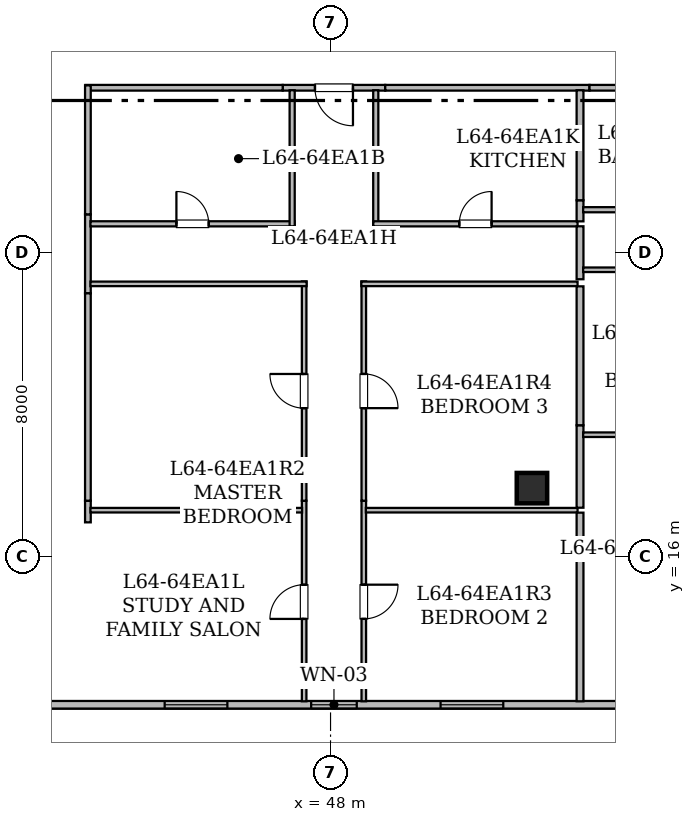
"""IFC4 building model, lengths in metres.
Left out: names, types, materials, properties, quantities, classifications, styles, units other than length and angle.
Written with IfcOpenShell. Run it as: python <this file> out.ifc"""

import sys

from ifc_helpers import new_model, si_unit, direction, frame, frame_2d, origin, origin_2d, place, context, subcontext, project, spatial, rectangle, hollow_rectangle, extrude, element, fill, save


model = new_model("IFC4")
c1 = context("Model", 3, precision=1e-05, world=origin(), true_north=direction((0.0, 1.0)))
c2 = subcontext(c1, "Body", "Model", "MODEL_VIEW")
j1 = project(units=[si_unit("LENGTHUNIT", "METRE"), si_unit("PLANEANGLEUNIT", "RADIAN")], contexts=[c1])
p1 = place(None, origin())
s1 = spatial("IfcSite", under=j1, at=p1, CompositionType="ELEMENT")
p2 = place(p1, origin())
s2 = spatial("IfcBuilding", under=s1, at=p2, CompositionType="ELEMENT")
p3 = place(p2, frame((0.0, 0.0, 250.05)))
s3 = spatial("IfcBuildingStorey", under=s2, at=p3, CompositionType="ELEMENT", Elevation=250.05)
for number, where, z_axis, x_axis in (
    (1, (51.083, 14.5, 0.0), (0.0, 0.0, 1.0), (1.0, 0.0, 0.0)),
    (2, (53.3, 17.8, 0.0), (0.0, 0.0, 1.0), (1.0, 0.0, 0.0)),
):
    element("IfcColumn", number, at=place(p3, frame(where, z_axis=z_axis, x_axis=x_axis)), inside=s3, PredefinedType="COLUMN", context=c2, shape_type="SweptSolid", body=[
        extrude(hollow_rectangle(XDim=0.8, YDim=0.8, WallThickness=0.04, at=origin_2d()), origin(), (0.0, 0.0, 1.0), 3.65),
    ])
p4 = place(p3, frame((65.696, 12.1, 0.0), z_axis=(0.0, 0.0, 1.0), x_axis=(-1.0, 0.0, 0.0)))
e3 = element("IfcWall", 3, at=p4, inside=s3, PredefinedType="STANDARD", context=c2, shape_type="SweptSolid", body=[
    extrude(rectangle(XDim=41.393, YDim=0.2, at=frame_2d((20.697, 0.0))), origin(), (0.0, 0.0, 1.0), 3.43),
])
p5 = place(p4, frame((33.821, 0.0, 0.85)))
e4 = element("IfcOpeningElement", 4, at=p5, cuts=e3, PredefinedType="OPENING", context=c2, shape_type="SweptSolid", body=[
    extrude(rectangle(XDim=1.65, YDim=1.55, at=frame_2d((0.825, 0.775))), frame((0.0, 0.11, 0.0), z_axis=(0.0, -1.0, 0.0), x_axis=(1.0, 0.0, 0.0)), (0.0, 0.0, 1.0), 0.22),
])
p6 = place(p4, frame((39.16, 0.0, 0.85)))
e5 = element("IfcOpeningElement", 5, at=p6, cuts=e3, PredefinedType="OPENING", context=c2, shape_type="SweptSolid", body=[
    extrude(rectangle(XDim=1.65, YDim=1.55, at=frame_2d((0.825, 0.775))), frame((0.0, 0.11, 0.0), z_axis=(0.0, -1.0, 0.0), x_axis=(1.0, 0.0, 0.0)), (0.0, 0.0, 1.0), 0.22),
])
p7 = place(p4, frame((17.006, 0.0, 0.8)))
e6 = element("IfcOpeningElement", 6, at=p7, cuts=e3, PredefinedType="OPENING", context=c2, shape_type="SweptSolid", body=[
    extrude(rectangle(XDim=1.2, YDim=1.5, at=frame_2d((0.6, 0.75))), frame((0.0, 0.11, 0.0), z_axis=(0.0, -1.0, 0.0), x_axis=(1.0, 0.0, 0.0)), (0.0, 0.0, 1.0), 0.22),
])
p8 = place(p4, frame((20.411, 0.0, 0.85)))
e7 = element("IfcOpeningElement", 7, at=p8, cuts=e3, PredefinedType="OPENING", context=c2, shape_type="SweptSolid", body=[
    extrude(rectangle(XDim=1.65, YDim=1.55, at=frame_2d((0.825, 0.775))), frame((0.0, 0.11, 0.0), z_axis=(0.0, -1.0, 0.0), x_axis=(1.0, 0.0, 0.0)), (0.0, 0.0, 1.0), 0.22),
])
p9 = place(p4, frame((13.151, 0.0, 0.85)))
e8 = element("IfcOpeningElement", 8, at=p9, cuts=e3, PredefinedType="OPENING", context=c2, shape_type="SweptSolid", body=[
    extrude(rectangle(XDim=1.65, YDim=1.55, at=frame_2d((0.825, 0.775))), frame((0.0, 0.11, 0.0), z_axis=(0.0, -1.0, 0.0), x_axis=(1.0, 0.0, 0.0)), (0.0, 0.0, 1.0), 0.22),
])
p10 = place(p4, frame((2.936, 0.0, 0.8)))
e9 = element("IfcOpeningElement", 9, at=p10, cuts=e3, PredefinedType="OPENING", context=c2, shape_type="SweptSolid", body=[
    extrude(rectangle(XDim=1.2, YDim=1.5, at=frame_2d((0.6, 0.75))), frame((0.0, 0.11, 0.0), z_axis=(0.0, -1.0, 0.0), x_axis=(1.0, 0.0, 0.0)), (0.0, 0.0, 1.0), 0.22),
])
p11 = place(p4, frame((6.901, 0.0, 0.85)))
e10 = element("IfcOpeningElement", 10, at=p11, cuts=e3, PredefinedType="OPENING", context=c2, shape_type="SweptSolid", body=[
    extrude(rectangle(XDim=1.65, YDim=1.55, at=frame_2d((0.825, 0.775))), frame((0.0, 0.11, 0.0), z_axis=(0.0, -1.0, 0.0), x_axis=(1.0, 0.0, 0.0)), (0.0, 0.0, 1.0), 0.22),
])
p12 = place(p3, frame((49.439, 28.335, 0.0), z_axis=(0.0, 0.0, 1.0), x_axis=(-1.0, 0.0, 0.0)))
e11 = element("IfcWall", 11, at=p12, inside=s3, PredefinedType="STANDARD", context=c2, shape_type="SweptSolid", body=[
    extrude(rectangle(XDim=2.698, YDim=0.15, at=frame_2d((1.349, 0.0))), origin(), (0.0, 0.0, 1.0), 3.43),
])
p13 = place(p12, frame((0.849, 0.0, 0.0)))
e12 = element("IfcOpeningElement", 12, at=p13, cuts=e11, PredefinedType="OPENING", context=c2, shape_type="SweptSolid", body=[
    extrude(rectangle(XDim=1.0, YDim=2.15, at=frame_2d((0.5, 1.075))), frame((0.0, 0.085, 0.0), z_axis=(0.0, -1.0, 0.0), x_axis=(1.0, 0.0, 0.0)), (0.0, 0.0, 1.0), 0.17),
])
p14 = place(p3, frame((41.615, 25.004, 0.0), z_axis=(0.0, 0.0, 1.0), x_axis=(0.0, -1.0, 0.0)))
e13 = element("IfcWall", 13, at=p14, inside=s3, PredefinedType="STANDARD", context=c2, shape_type="SweptSolid", body=[
    extrude(rectangle(XDim=2.078, YDim=0.15, at=frame_2d((1.039, 0.0))), origin(), (0.0, 0.0, 1.0), 3.43),
])
p15 = place(p3, frame((46.741, 28.335, 0.0), z_axis=(0.0, 0.0, 1.0), x_axis=(-1.0, 0.0, 0.0)))
e14 = element("IfcWall", 14, at=p15, inside=s3, PredefinedType="STANDARD", context=c2, shape_type="SweptSolid", body=[
    extrude(rectangle(XDim=5.191, YDim=0.15, at=frame_2d((2.595, 0.0))), origin(), (0.0, 0.0, 1.0), 3.43),
])
p16 = place(p3, frame((41.615, 28.398, 0.0), z_axis=(0.0, 0.0, 1.0), x_axis=(0.0, -1.0, 0.0)))
e15 = element("IfcWall", 15, at=p16, inside=s3, PredefinedType="STANDARD", context=c2, shape_type="SweptSolid", body=[
    extrude(rectangle(XDim=3.394, YDim=0.15, at=frame_2d((1.697, 0.0))), origin(), (0.0, 0.0, 1.0), 3.43),
])
p17 = place(p3, frame((54.814, 28.335, 0.0), z_axis=(0.0, 0.0, 1.0), x_axis=(-1.0, 0.0, 0.0)))
e16 = element("IfcWall", 16, at=p17, inside=s3, PredefinedType="STANDARD", context=c2, shape_type="SweptSolid", body=[
    extrude(rectangle(XDim=5.375, YDim=0.15, at=frame_2d((2.688, 0.0))), origin(), (0.0, 0.0, 1.0), 2.725),
])
p18 = place(p3, frame((41.615, 17.469, 0.0), z_axis=(0.0, 0.0, 1.0), x_axis=(0.0, -1.0, 0.0)))
e17 = element("IfcWall", 17, at=p18, inside=s3, PredefinedType="STANDARD", context=c2, shape_type="SweptSolid", body=[
    extrude(rectangle(XDim=0.569, YDim=0.15, at=frame_2d((0.285, 0.0))), origin(), (0.0, 0.0, 1.0), 3.43),
])
p19 = place(p3, frame((41.615, 22.926, 0.0), z_axis=(0.0, 0.0, 1.0), x_axis=(0.0, -1.0, 0.0)))
e18 = element("IfcWall", 18, at=p19, inside=s3, PredefinedType="STANDARD", context=c2, shape_type="SweptSolid", body=[
    extrude(rectangle(XDim=5.457, YDim=0.15, at=frame_2d((2.729, 0.0))), origin(), (0.0, 0.0, 1.0), 2.725),
])
p20 = place(p3, frame((59.796, 28.335, 0.0), z_axis=(0.0, 0.0, 1.0), x_axis=(-1.0, 0.0, 0.0)))
e19 = element("IfcWall", 19, at=p20, inside=s3, PredefinedType="STANDARD", context=c2, shape_type="SweptSolid", body=[
    extrude(rectangle(XDim=4.982, YDim=0.15, at=frame_2d((2.491, 0.0))), origin(), (0.0, 0.0, 1.0), 3.43),
])
p21 = place(p3, frame((41.682, 24.755, 0.0), z_axis=(0.0, 0.0, 1.0), x_axis=(1.0, 0.0, 0.0)))
e20 = element("IfcWall", 20, at=p21, inside=s3, PredefinedType="PARTITIONING", context=c2, shape_type="SweptSolid", body=[
    extrude(rectangle(XDim=5.373, YDim=0.135, at=frame_2d((2.687, 0.0))), origin(), (0.0, 0.0, 1.0), 3.43),
])
p22 = place(p21, frame((2.262, 0.0, 0.0)))
e21 = element("IfcOpeningElement", 21, at=p22, cuts=e20, PredefinedType="OPENING", context=c2, shape_type="SweptSolid", body=[
    extrude(rectangle(XDim=0.85, YDim=2.1, at=frame_2d((0.425, 1.05))), frame((0.0, 0.077, 0.0), z_axis=(0.0, -1.0, 0.0), x_axis=(1.0, 0.0, 0.0)), (0.0, 0.0, 1.0), 0.155),
])
for number, where, z_axis, x_axis in (
    (22, (46.99, 24.69, 0.0), (0.0, 0.0, 1.0), (0.0, 1.0, 0.0)),
    (23, (49.19, 28.27, 0.0), (0.0, 0.0, 1.0), (0.0, -1.0, 0.0)),
):
    element("IfcWall", number, at=place(p3, frame(where, z_axis=z_axis, x_axis=x_axis)), inside=s3, PredefinedType="PARTITIONING", context=c2, shape_type="SweptSolid", body=[
        extrude(rectangle(XDim=3.58, YDim=0.135, at=frame_2d((1.79, 0.0))), origin(), (0.0, 0.0, 1.0), 3.43),
    ])
p23 = place(p3, frame((49.125, 24.755, 0.0), z_axis=(0.0, 0.0, 1.0), x_axis=(1.0, 0.0, 0.0)))
e24 = element("IfcWall", 24, at=p23, inside=s3, PredefinedType="PARTITIONING", context=c2, shape_type="SweptSolid", body=[
    extrude(rectangle(XDim=5.375, YDim=0.135, at=frame_2d((2.688, 0.0))), origin(), (0.0, 0.0, 1.0), 2.725),
])
p24 = place(p23, frame((2.263, 0.0, 0.0)))
e25 = element("IfcOpeningElement", 25, at=p24, cuts=e24, PredefinedType="OPENING", context=c2, shape_type="SweptSolid", body=[
    extrude(rectangle(XDim=0.85, YDim=2.1, at=frame_2d((0.425, 1.05))), frame((0.0, 0.077, 0.0), z_axis=(0.0, -1.0, 0.0), x_axis=(1.0, 0.0, 0.0)), (0.0, 0.0, 1.0), 0.155),
])
p25 = place(p3, frame((47.305, 12.192, 0.0), z_axis=(0.0, 0.0, 1.0), x_axis=(0.0, 1.0, 0.0)))
e26 = element("IfcWall", 26, at=p25, inside=s3, PredefinedType="PARTITIONING", context=c2, shape_type="SweptSolid", body=[
    extrude(rectangle(XDim=5.277, YDim=0.12, at=frame_2d((2.639, 0.0))), origin(), (0.0, 0.0, 1.0), 2.725),
])
p26 = place(p25, frame((2.167, 0.0, 0.0)))
e27 = element("IfcOpeningElement", 27, at=p26, cuts=e26, PredefinedType="OPENING", context=c2, shape_type="SweptSolid", body=[
    extrude(rectangle(XDim=0.9, YDim=2.1, at=frame_2d((0.45, 1.05))), frame((0.0, 0.07, 0.0), z_axis=(0.0, -1.0, 0.0), x_axis=(1.0, 0.0, 0.0)), (0.0, 0.0, 1.0), 0.14),
])
p27 = place(p3, frame((47.305, 17.469, 0.0), z_axis=(0.0, 0.0, 1.0), x_axis=(0.0, 1.0, 0.0)))
e28 = element("IfcWall", 28, at=p27, inside=s3, PredefinedType="PARTITIONING", context=c2, shape_type="SweptSolid", body=[
    extrude(rectangle(XDim=5.771, YDim=0.12, at=frame_2d((2.885, 0.0))), origin(), (0.0, 0.0, 1.0), 2.725),
])
p28 = place(p27, frame((2.435, 0.0, 0.0)))
e29 = element("IfcOpeningElement", 29, at=p28, cuts=e28, PredefinedType="OPENING", context=c2, shape_type="SweptSolid", body=[
    extrude(rectangle(XDim=0.9, YDim=2.1, at=frame_2d((0.45, 1.05))), frame((0.0, 0.07, 0.0), z_axis=(0.0, -1.0, 0.0), x_axis=(1.0, 0.0, 0.0)), (0.0, 0.0, 1.0), 0.14),
])
p29 = place(p3, frame((47.37, 23.175, 0.0), z_axis=(0.0, 0.0, 1.0), x_axis=(-1.0, 0.0, 0.0)))
e30 = element("IfcWall", 30, at=p29, inside=s3, PredefinedType="PARTITIONING", context=c2, shape_type="SweptSolid", body=[
    extrude(rectangle(XDim=5.688, YDim=0.12, at=frame_2d((2.844, 0.0))), origin(), (0.0, 0.0, 1.0), 3.43),
])
p30 = place(p3, frame((48.875, 17.469, 0.0), z_axis=(0.0, 0.0, 1.0), x_axis=(0.0, -1.0, 0.0)))
e31 = element("IfcWall", 31, at=p30, inside=s3, PredefinedType="PARTITIONING", context=c2, shape_type="SweptSolid", body=[
    extrude(rectangle(XDim=5.277, YDim=0.12, at=frame_2d((2.639, 0.0))), origin(), (0.0, 0.0, 1.0), 2.725),
])
p31 = place(p30, frame((2.209, 0.0, 0.0)))
e32 = element("IfcOpeningElement", 32, at=p31, cuts=e31, PredefinedType="OPENING", context=c2, shape_type="SweptSolid", body=[
    extrude(rectangle(XDim=0.9, YDim=2.1, at=frame_2d((0.45, 1.05))), frame((0.0, 0.07, 0.0), z_axis=(0.0, -1.0, 0.0), x_axis=(1.0, 0.0, 0.0)), (0.0, 0.0, 1.0), 0.14),
])
p32 = place(p3, frame((48.875, 23.24, 0.0), z_axis=(0.0, 0.0, 1.0), x_axis=(0.0, -1.0, 0.0)))
e33 = element("IfcWall", 33, at=p32, inside=s3, PredefinedType="PARTITIONING", context=c2, shape_type="SweptSolid", body=[
    extrude(rectangle(XDim=5.771, YDim=0.12, at=frame_2d((2.885, 0.0))), origin(), (0.0, 0.0, 1.0), 2.725),
])
p33 = place(p32, frame((2.435, 0.0, 0.0)))
e34 = element("IfcOpeningElement", 34, at=p33, cuts=e33, PredefinedType="OPENING", context=c2, shape_type="SweptSolid", body=[
    extrude(rectangle(XDim=0.9, YDim=2.1, at=frame_2d((0.45, 1.05))), frame((0.0, 0.07, 0.0), z_axis=(0.0, -1.0, 0.0), x_axis=(1.0, 0.0, 0.0)), (0.0, 0.0, 1.0), 0.14),
])
p34 = place(p3, frame((54.5, 23.175, 0.0), z_axis=(0.0, 0.0, 1.0), x_axis=(-1.0, 0.0, 0.0)))
e35 = element("IfcWall", 35, at=p34, inside=s3, PredefinedType="PARTITIONING", context=c2, shape_type="SweptSolid", body=[
    extrude(rectangle(XDim=5.69, YDim=0.12, at=frame_2d((2.845, 0.0))), origin(), (0.0, 0.0, 1.0), 2.725),
])
p35 = place(p3, frame((54.565, 24.69, 0.0), z_axis=(0.0, 0.0, 1.0), x_axis=(0.0, -1.0, 0.0)))
e36 = element("IfcWall", 36, at=p35, inside=s3, PredefinedType="STANDARD", context=c2, shape_type="SweptSolid", body=[
    extrude(rectangle(XDim=1.393, YDim=0.18, at=frame_2d((0.696, 0.0))), origin(), (0.0, 0.0, 1.0), 3.43),
])
p36 = place(p3, frame((54.565, 25.375, 0.0), z_axis=(0.0, 0.0, 1.0), x_axis=(0.0, -1.0, 0.0)))
e37 = element("IfcWall", 37, at=p36, inside=s3, PredefinedType="STANDARD", context=c2, shape_type="SweptSolid", body=[
    extrude(rectangle(XDim=0.555, YDim=0.18, at=frame_2d((0.277, 0.0))), origin(), (0.0, 0.0, 1.0), 3.43),
])
p37 = place(p3, frame((54.565, 28.27, 0.0), z_axis=(0.0, 0.0, 1.0), x_axis=(0.0, -1.0, 0.0)))
e38 = element("IfcWall", 38, at=p37, inside=s3, PredefinedType="STANDARD", context=c2, shape_type="SweptSolid", body=[
    extrude(rectangle(XDim=2.895, YDim=0.18, at=frame_2d((1.448, 0.0))), origin(), (0.0, 0.0, 1.0), 3.43),
])
p38 = place(p3, frame((41.682, 17.22, 0.0), z_axis=(0.0, 0.0, 1.0), x_axis=(1.0, 0.0, 0.0)))
e39 = element("IfcWall", 39, at=p38, inside=s3, PredefinedType="PARTITIONING", context=c2, shape_type="SweptSolid", body=[
    extrude(rectangle(XDim=5.569, YDim=0.12, at=frame_2d((2.785, 0.0))), origin(), (0.0, 0.0, 1.0), 2.725),
])
p39 = place(p3, frame((48.929, 17.22, 0.0), z_axis=(0.0, 0.0, 1.0), x_axis=(1.0, 0.0, 0.0)))
e40 = element("IfcWall", 40, at=p39, inside=s3, PredefinedType="PARTITIONING", context=c2, shape_type="SweptSolid", body=[
    extrude(rectangle(XDim=5.571, YDim=0.12, at=frame_2d((2.786, 0.0))), origin(), (0.0, 0.0, 1.0), 2.725),
])
p40 = place(p3, frame((54.565, 17.155, 0.0), z_axis=(0.0, 0.0, 1.0), x_axis=(0.0, -1.0, 0.0)))
e41 = element("IfcWall", 41, at=p40, inside=s3, PredefinedType="STANDARD", context=c2, shape_type="SweptSolid", body=[
    extrude(rectangle(XDim=4.963, YDim=0.18, at=frame_2d((2.481, 0.0))), origin(), (0.0, 0.0, 1.0), 2.725),
])
p41 = place(p3, frame((54.565, 19.455, 0.0), z_axis=(0.0, 0.0, 1.0), x_axis=(0.0, -1.0, 0.0)))
e42 = element("IfcWall", 42, at=p41, inside=s3, PredefinedType="STANDARD", context=c2, shape_type="SweptSolid", body=[
    extrude(rectangle(XDim=2.17, YDim=0.18, at=frame_2d((1.085, 0.0))), origin(), (0.0, 0.0, 1.0), 2.725),
])
p42 = place(p3, frame((54.565, 23.11, 0.0), z_axis=(0.0, 0.0, 1.0), x_axis=(0.0, -1.0, 0.0)))
e43 = element("IfcWall", 43, at=p42, inside=s3, PredefinedType="STANDARD", context=c2, shape_type="SweptSolid", body=[
    extrude(rectangle(XDim=3.655, YDim=0.18, at=frame_2d((1.828, 0.0))), origin(), (0.0, 0.0, 1.0), 3.43),
])
p43 = place(p3, frame((54.647, 25.126, 0.0), z_axis=(0.0, 0.0, 1.0), x_axis=(1.0, 0.0, 0.0)))
e44 = element("IfcWall", 44, at=p43, inside=s3, PredefinedType="PARTITIONING", context=c2, shape_type="SweptSolid", body=[
    extrude(rectangle(XDim=5.464, YDim=0.135, at=frame_2d((2.732, 0.0))), origin(), (0.0, 0.0, 1.0), 3.43),
])
p44 = place(p43, frame((2.307, 0.0, 0.0)))
e45 = element("IfcOpeningElement", 45, at=p44, cuts=e44, PredefinedType="OPENING", context=c2, shape_type="SweptSolid", body=[
    extrude(rectangle(XDim=0.85, YDim=2.1, at=frame_2d((0.425, 1.05))), frame((0.0, 0.077, 0.0), z_axis=(0.0, -1.0, 0.0), x_axis=(1.0, 0.0, 0.0)), (0.0, 0.0, 1.0), 0.155),
])
p45 = place(p3, frame((61.44, 23.546, 0.0), z_axis=(0.0, 0.0, 1.0), x_axis=(-1.0, 0.0, 0.0)))
e46 = element("IfcWall", 46, at=p45, inside=s3, PredefinedType="PARTITIONING", context=c2, shape_type="SweptSolid", body=[
    extrude(rectangle(XDim=6.793, YDim=0.12, at=frame_2d((3.396, 0.0))), origin(), (0.0, 0.0, 1.0), 3.43),
])
p46 = place(p45, frame((2.946, 0.0, 0.0)))
e47 = element("IfcOpeningElement", 47, at=p46, cuts=e46, PredefinedType="OPENING", context=c2, shape_type="SweptSolid", body=[
    extrude(rectangle(XDim=0.9, YDim=2.1, at=frame_2d((0.45, 1.05))), frame((0.0, 0.07, 0.0), z_axis=(0.0, -1.0, 0.0), x_axis=(1.0, 0.0, 0.0)), (0.0, 0.0, 1.0), 0.14),
])
p47 = place(p3, frame((54.647, 19.206, 0.0), z_axis=(0.0, 0.0, 1.0), x_axis=(1.0, 0.0, 0.0)))
e48 = element("IfcWall", 48, at=p47, inside=s3, PredefinedType="PARTITIONING", context=c2, shape_type="SweptSolid", body=[
    extrude(rectangle(XDim=6.674, YDim=0.12, at=frame_2d((3.337, 0.0))), origin(), (0.0, 0.0, 1.0), 2.725),
])
p48 = place(p7, origin())
e49 = element("IfcWindow", 49, at=p48, inside=s3, PartitioningType="SINGLE_PANEL", PredefinedType="WINDOW", context=c2, shape_type="SweptSolid", body=[
    extrude(rectangle(XDim=1.2, YDim=1.5, at=frame_2d((0.6, 0.75))), frame((0.0, 0.03, 0.0), z_axis=(0.0, -1.0, 0.0), x_axis=(1.0, 0.0, 0.0)), (0.0, 0.0, 1.0), 0.06),
])
fill(e6, e49)
p49 = place(p8, origin())
e50 = element("IfcWindow", 50, at=p49, inside=s3, PartitioningType="SINGLE_PANEL", PredefinedType="WINDOW", context=c2, shape_type="SweptSolid", body=[
    extrude(rectangle(XDim=1.65, YDim=1.55, at=frame_2d((0.825, 0.775))), frame((0.0, 0.03, 0.0), z_axis=(0.0, -1.0, 0.0), x_axis=(1.0, 0.0, 0.0)), (0.0, 0.0, 1.0), 0.06),
])
fill(e7, e50)
p50 = place(p9, origin())
e51 = element("IfcWindow", 51, at=p50, inside=s3, PartitioningType="SINGLE_PANEL", PredefinedType="WINDOW", context=c2, shape_type="SweptSolid", body=[
    extrude(rectangle(XDim=1.65, YDim=1.55, at=frame_2d((0.825, 0.775))), frame((0.0, 0.03, 0.0), z_axis=(0.0, -1.0, 0.0), x_axis=(1.0, 0.0, 0.0)), (0.0, 0.0, 1.0), 0.06),
])
fill(e8, e51)
p51 = place(p13, origin())
e52 = element("IfcDoor", 52, at=p51, inside=s3, OperationType="SINGLE_SWING_LEFT", PredefinedType="DOOR", context=c2, shape_type="SweptSolid", body=[
    extrude(rectangle(XDim=1.0, YDim=2.15, at=frame_2d((0.5, 1.075))), frame((0.0, 0.025, 0.0), z_axis=(0.0, -1.0, 0.0), x_axis=(1.0, 0.0, 0.0)), (0.0, 0.0, 1.0), 0.05),
])
fill(e12, e52)
p52 = place(p22, origin())
e53 = element("IfcDoor", 53, at=p52, inside=s3, OperationType="SINGLE_SWING_LEFT", PredefinedType="DOOR", context=c2, shape_type="SweptSolid", body=[
    extrude(rectangle(XDim=0.85, YDim=2.1, at=frame_2d((0.425, 1.05))), frame((0.0, 0.025, 0.0), z_axis=(0.0, -1.0, 0.0), x_axis=(1.0, 0.0, 0.0)), (0.0, 0.0, 1.0), 0.05),
])
fill(e21, e53)
p53 = place(p24, origin())
e54 = element("IfcDoor", 54, at=p53, inside=s3, OperationType="SINGLE_SWING_RIGHT", PredefinedType="DOOR", context=c2, shape_type="SweptSolid", body=[
    extrude(rectangle(XDim=0.85, YDim=2.1, at=frame_2d((0.425, 1.05))), frame((0.0, 0.025, 0.0), z_axis=(0.0, -1.0, 0.0), x_axis=(1.0, 0.0, 0.0)), (0.0, 0.0, 1.0), 0.05),
])
fill(e25, e54)
p54 = place(p26, origin())
e55 = element("IfcDoor", 55, at=p54, inside=s3, OperationType="SINGLE_SWING_LEFT", PredefinedType="DOOR", context=c2, shape_type="SweptSolid", body=[
    extrude(rectangle(XDim=0.9, YDim=2.1, at=frame_2d((0.45, 1.05))), frame((0.0, 0.025, 0.0), z_axis=(0.0, -1.0, 0.0), x_axis=(1.0, 0.0, 0.0)), (0.0, 0.0, 1.0), 0.05),
])
fill(e27, e55)
p55 = place(p28, origin())
e56 = element("IfcDoor", 56, at=p55, inside=s3, OperationType="SINGLE_SWING_RIGHT", PredefinedType="DOOR", context=c2, shape_type="SweptSolid", body=[
    extrude(rectangle(XDim=0.9, YDim=2.1, at=frame_2d((0.45, 1.05))), frame((0.0, 0.025, 0.0), z_axis=(0.0, -1.0, 0.0), x_axis=(1.0, 0.0, 0.0)), (0.0, 0.0, 1.0), 0.05),
])
fill(e29, e56)
p56 = place(p31, origin())
e57 = element("IfcDoor", 57, at=p56, inside=s3, OperationType="SINGLE_SWING_LEFT", PredefinedType="DOOR", context=c2, shape_type="SweptSolid", body=[
    extrude(rectangle(XDim=0.9, YDim=2.1, at=frame_2d((0.45, 1.05))), frame((0.0, 0.025, 0.0), z_axis=(0.0, -1.0, 0.0), x_axis=(1.0, 0.0, 0.0)), (0.0, 0.0, 1.0), 0.05),
])
fill(e32, e57)
p57 = place(p33, origin())
e58 = element("IfcDoor", 58, at=p57, inside=s3, OperationType="SINGLE_SWING_RIGHT", PredefinedType="DOOR", context=c2, shape_type="SweptSolid", body=[
    extrude(rectangle(XDim=0.9, YDim=2.1, at=frame_2d((0.45, 1.05))), frame((0.0, 0.025, 0.0), z_axis=(0.0, -1.0, 0.0), x_axis=(1.0, 0.0, 0.0)), (0.0, 0.0, 1.0), 0.05),
])
fill(e34, e58)
save(model, sys.argv[1])
